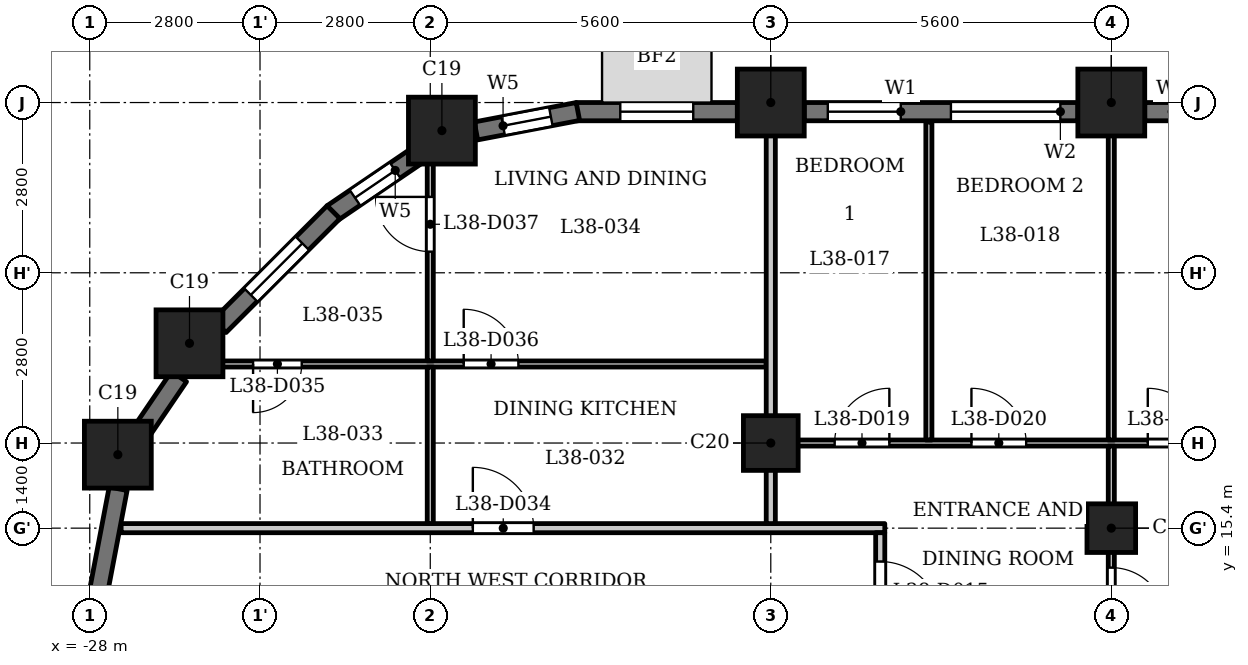
"""IFC4 building model, lengths in metres.
Left out: names, types, materials, properties, quantities, classifications, styles, units other than length and angle.
Written with IfcOpenShell. Run it as: python <this file> out.ifc"""

import sys

from ifc_helpers import new_model, si_unit, direction, frame, frame_2d, origin, origin_2d, place, context, subcontext, project, spatial, rectangle, extrude, element, fill, save


model = new_model("IFC4")
c1 = context("Model", 3, precision=1e-05, world=origin(), true_north=direction((0.0, 1.0)))
c2 = subcontext(c1, "Body", "Model", "MODEL_VIEW")
j1 = project(units=[si_unit("LENGTHUNIT", "METRE"), si_unit("PLANEANGLEUNIT", "RADIAN")], contexts=[c1])
p1 = place(None, origin())
s1 = spatial("IfcSite", under=j1, at=p1, CompositionType="ELEMENT")
p2 = place(p1, origin())
s2 = spatial("IfcBuilding", under=s1, at=p2, CompositionType="ELEMENT")
p3 = place(p2, frame((0.0, 0.0, 150.1)))
s3 = spatial("IfcBuildingStorey", under=s2, at=p3, CompositionType="ELEMENT", Elevation=150.1)
for number, where, z_axis, x_axis in (
    (1, (-11.2, 22.4, 0.0), (0.0, 0.0, 1.0), (1.0, 0.0, 0.0)),
    (2, (-16.8, 22.4, 0.0), (0.0, 0.0, 1.0), (1.0, 0.0, 0.0)),
    (3, (-22.209, 21.938, 0.0), (0.0, 0.0, 1.0), (1.0, 0.0, 0.0)),
    (4, (-26.36, 18.44, 0.0), (0.0, 0.0, 1.0), (1.0, 0.0, 0.0)),
    (5, (-27.538, 16.609, 0.0), (0.0, 0.0, 1.0), (1.0, 0.0, 0.0)),
):
    element("IfcColumn", number, at=place(p3, frame(where, z_axis=z_axis, x_axis=x_axis)), inside=s3, PredefinedType="COLUMN", context=c2, shape_type="SweptSolid", body=[
        extrude(rectangle(XDim=1.1, YDim=1.1, at=origin_2d()), origin(), (0.0, 0.0, 1.0), 3.5),
    ])
p4 = place(p3, frame((-16.8, 16.8, 0.0), z_axis=(0.0, 0.0, 1.0), x_axis=(1.0, 0.0, 0.0)))
e6 = element("IfcColumn", 6, at=p4, inside=s3, PredefinedType="COLUMN", context=c2, shape_type="SweptSolid", body=[
    extrude(rectangle(XDim=0.9, YDim=0.9, at=origin_2d()), origin(), (0.0, 0.0, 1.0), 3.5),
])
p5 = place(p3, frame((-11.2, 15.4, 0.0), z_axis=(0.0, 0.0, 1.0), x_axis=(1.0, 0.0, 0.0)))
e7 = element("IfcColumn", 7, at=p5, inside=s3, PredefinedType="COLUMN", context=c2, shape_type="SweptSolid", body=[
    extrude(rectangle(XDim=0.8, YDim=0.8, at=origin_2d()), origin(), (0.0, 0.0, 1.0), 3.5),
])
p6 = place(p3, frame((-6.15, 22.25, 0.0), z_axis=(0.0, 0.0, 1.0), x_axis=(-1.0, 0.0, 0.0)))
e8 = element("IfcWall", 8, at=p6, inside=s3, PredefinedType="SOLIDWALL", context=c2, shape_type="SweptSolid", body=[
    extrude(rectangle(XDim=4.5, YDim=0.3, at=frame_2d((2.25, 0.0))), origin(), (0.0, 0.0, 1.0), 2.45),
])
p7 = place(p6, frame((0.45, 0.0, 1.2)))
e9 = element("IfcOpeningElement", 9, at=p7, cuts=e8, PredefinedType="OPENING", context=c2, shape_type="SweptSolid", body=[
    extrude(rectangle(XDim=3.6, YDim=0.95, at=frame_2d((1.8, 0.475))), frame((0.0, 0.16, 0.0), z_axis=(0.0, -1.0, 0.0), x_axis=(1.0, 0.0, 0.0)), (0.0, 0.0, 1.0), 0.32),
])
p8 = place(p3, frame((-11.75, 22.25, 0.0), z_axis=(0.0, 0.0, 1.0), x_axis=(-1.0, 0.0, 0.0)))
e10 = element("IfcWall", 10, at=p8, inside=s3, PredefinedType="SOLIDWALL", context=c2, shape_type="SweptSolid", body=[
    extrude(rectangle(XDim=4.5, YDim=0.3, at=frame_2d((2.25, 0.0))), origin(), (0.0, 0.0, 1.0), 2.45),
])
p9 = place(p8, frame((0.288, 0.0, 0.9)))
e11 = element("IfcOpeningElement", 11, at=p9, cuts=e10, PredefinedType="OPENING", context=c2, shape_type="SweptSolid", body=[
    extrude(rectangle(XDim=1.8, YDim=1.25, at=frame_2d((0.9, 0.625))), frame((0.0, 0.16, 0.0), z_axis=(0.0, -1.0, 0.0), x_axis=(1.0, 0.0, 0.0)), (0.0, 0.0, 1.0), 0.32),
])
p10 = place(p8, frame((2.913, 0.0, 0.6)))
e12 = element("IfcOpeningElement", 12, at=p10, cuts=e10, PredefinedType="OPENING", context=c2, shape_type="SweptSolid", body=[
    extrude(rectangle(XDim=1.2, YDim=1.55, at=frame_2d((0.6, 0.775))), frame((0.0, 0.16, 0.0), z_axis=(0.0, -1.0, 0.0), x_axis=(1.0, 0.0, 0.0)), (0.0, 0.0, 1.0), 0.32),
])
p11 = place(p3, frame((-17.35, 22.25, 0.0), z_axis=(0.0, 0.0, 1.0), x_axis=(-1.0, 0.0, 0.0)))
e13 = element("IfcWall", 13, at=p11, inside=s3, PredefinedType="SOLIDWALL", context=c2, shape_type="SweptSolid", body=[
    extrude(rectangle(XDim=2.65, YDim=0.3, at=frame_2d((1.325, 0.0))), origin(), (0.0, 0.0, 1.0), 2.45),
])
p12 = place(p11, frame((0.725, 0.0, 0.6)))
e14 = element("IfcOpeningElement", 14, at=p12, cuts=e13, PredefinedType="OPENING", context=c2, shape_type="SweptSolid", body=[
    extrude(rectangle(XDim=1.2, YDim=1.55, at=frame_2d((0.6, 0.775))), frame((0.0, 0.16, 0.0), z_axis=(0.0, -1.0, 0.0), x_axis=(1.0, 0.0, 0.0)), (0.0, 0.0, 1.0), 0.32),
])
p13 = place(p3, frame((-19.972, 22.253, 0.0), z_axis=(0.0, 0.0, 1.0), x_axis=(-0.982297206936, -0.187329114784, 0.0)))
e15 = element("IfcWall", 15, at=p13, inside=s3, PredefinedType="SOLIDWALL", context=c2, shape_type="SweptSolid", body=[
    extrude(rectangle(XDim=1.706, YDim=0.3, at=frame_2d((0.853, 0.0))), origin(), (0.0, 0.0, 1.0), 2.45),
])
p14 = place(p13, frame((0.453, 0.0, 0.6)))
e16 = element("IfcOpeningElement", 16, at=p14, cuts=e15, PredefinedType="OPENING", context=c2, shape_type="SweptSolid", body=[
    extrude(rectangle(XDim=0.8, YDim=1.55, at=frame_2d((0.4, 0.775))), frame((0.0, 0.16, 0.0), z_axis=(0.0, -1.0, 0.0), x_axis=(1.0, 0.0, 0.0)), (0.0, 0.0, 1.0), 0.32),
])
p15 = place(p3, frame((-22.602, 21.538, 0.0), z_axis=(0.0, 0.0, 1.0), x_axis=(-0.827040942766, -0.562141689424, 0.0)))
e17 = element("IfcWall", 17, at=p15, inside=s3, PredefinedType="SOLIDWALL", context=c2, shape_type="SweptSolid", body=[
    extrude(rectangle(XDim=1.706, YDim=0.3, at=frame_2d((0.853, 0.0))), origin(), (0.0, 0.0, 1.0), 2.45),
])
p16 = place(p15, frame((0.453, 0.0, 0.6)))
e18 = element("IfcOpeningElement", 18, at=p16, cuts=e17, PredefinedType="OPENING", context=c2, shape_type="SweptSolid", body=[
    extrude(rectangle(XDim=0.8, YDim=1.55, at=frame_2d((0.4, 0.775))), frame((0.0, 0.16, 0.0), z_axis=(0.0, -1.0, 0.0), x_axis=(1.0, 0.0, 0.0)), (0.0, 0.0, 1.0), 0.32),
])
p17 = place(p3, frame((-23.991, 20.597, 0.0), z_axis=(0.0, 0.0, 1.0), x_axis=(-0.707106781187, -0.707106781187, 0.0)))
e19 = element("IfcWall", 19, at=p17, inside=s3, PredefinedType="SOLIDWALL", context=c2, shape_type="SweptSolid", body=[
    extrude(rectangle(XDim=2.65, YDim=0.3, at=frame_2d((1.325, 0.0))), origin(), (0.0, 0.0, 1.0), 2.45),
])
p18 = place(p17, frame((0.725, 0.0, 0.6)))
e20 = element("IfcOpeningElement", 20, at=p18, cuts=e19, PredefinedType="OPENING", context=c2, shape_type="SweptSolid", body=[
    extrude(rectangle(XDim=1.2, YDim=1.55, at=frame_2d((0.6, 0.775))), frame((0.0, 0.16, 0.0), z_axis=(0.0, -1.0, 0.0), x_axis=(1.0, 0.0, 0.0)), (0.0, 0.0, 1.0), 0.32),
])
p19 = place(p3, frame((-26.532, 17.893, 0.0), z_axis=(0.0, 0.0, 1.0), x_axis=(-0.562105419172, -0.82706559458, 0.0)))
e21 = element("IfcWall", 21, at=p19, inside=s3, PredefinedType="SOLIDWALL", context=c2, shape_type="SweptSolid", body=[
    extrude(rectangle(XDim=1.077, YDim=0.3, at=frame_2d((0.539, 0.0))), origin(), (0.0, 0.0, 1.0), 3.2),
])
p20 = place(p3, frame((-27.533, 16.048, 0.0), z_axis=(0.0, 0.0, 1.0), x_axis=(-0.187302784601, -0.982302227871, 0.0)))
e22 = element("IfcWall", 22, at=p20, inside=s3, PredefinedType="SOLIDWALL", context=c2, shape_type="SweptSolid", body=[
    extrude(rectangle(XDim=1.706, YDim=0.3, at=frame_2d((0.853, 0.0))), origin(), (0.0, 0.0, 1.0), 2.45),
])
p21 = place(p3, frame((-27.484, 15.4, 0.0), z_axis=(0.0, 0.0, 1.0), x_axis=(1.0, 0.0, 0.0)))
e23 = element("IfcWall", 23, at=p21, inside=s3, PredefinedType="PARTITIONING", context=c2, shape_type="SweptSolid", body=[
    extrude(rectangle(XDim=12.559, YDim=0.15, at=frame_2d((6.279, 0.0))), origin(), (0.0, 0.0, 1.0), 3.2),
])
p22 = place(p21, frame((5.784, 0.0, 0.0)))
e24 = element("IfcOpeningElement", 24, at=p22, cuts=e23, PredefinedType="OPENING", context=c2, shape_type="SweptSolid", body=[
    extrude(rectangle(XDim=1.0, YDim=2.1, at=frame_2d((0.5, 1.05))), frame((0.0, 0.085, 0.0), z_axis=(0.0, -1.0, 0.0), x_axis=(1.0, 0.0, 0.0)), (0.0, 0.0, 1.0), 0.17),
])
p23 = place(p3, frame((-16.725, 16.8, 0.0), z_axis=(0.0, 0.0, 1.0), x_axis=(1.0, 0.0, 0.0)))
e25 = element("IfcWall", 25, at=p23, inside=s3, PredefinedType="PARTITIONING", context=c2, shape_type="SweptSolid", body=[
    extrude(rectangle(XDim=33.45, YDim=0.1, at=frame_2d((16.725, 0.0))), origin(), (0.0, 0.0, 1.0), 3.2),
])
p24 = place(p23, frame((9.575, 0.0, 0.0)))
e26 = element("IfcOpeningElement", 26, at=p24, cuts=e25, PredefinedType="OPENING", context=c2, shape_type="SweptSolid", body=[
    extrude(rectangle(XDim=0.8, YDim=2.1, at=frame_2d((0.4, 1.05))), frame((0.0, 0.06, 0.0), z_axis=(0.0, -1.0, 0.0), x_axis=(1.0, 0.0, 0.0)), (0.0, 0.0, 1.0), 0.12),
])
p25 = place(p23, frame((6.125, 0.0, 0.0)))
e27 = element("IfcOpeningElement", 27, at=p25, cuts=e25, PredefinedType="OPENING", context=c2, shape_type="SweptSolid", body=[
    extrude(rectangle(XDim=0.9, YDim=2.1, at=frame_2d((0.45, 1.05))), frame((0.0, 0.06, 0.0), z_axis=(0.0, -1.0, 0.0), x_axis=(1.0, 0.0, 0.0)), (0.0, 0.0, 1.0), 0.12),
])
p26 = place(p23, frame((0.975, 0.0, 0.0)))
e28 = element("IfcOpeningElement", 28, at=p26, cuts=e25, PredefinedType="OPENING", context=c2, shape_type="SweptSolid", body=[
    extrude(rectangle(XDim=0.9, YDim=2.1, at=frame_2d((0.45, 1.05))), frame((0.0, 0.06, 0.0), z_axis=(0.0, -1.0, 0.0), x_axis=(1.0, 0.0, 0.0)), (0.0, 0.0, 1.0), 0.12),
])
p27 = place(p23, frame((3.225, 0.0, 0.0)))
e29 = element("IfcOpeningElement", 29, at=p27, cuts=e25, PredefinedType="OPENING", context=c2, shape_type="SweptSolid", body=[
    extrude(rectangle(XDim=0.9, YDim=2.1, at=frame_2d((0.45, 1.05))), frame((0.0, 0.06, 0.0), z_axis=(0.0, -1.0, 0.0), x_axis=(1.0, 0.0, 0.0)), (0.0, 0.0, 1.0), 0.12),
])
p28 = place(p23, frame((15.375, 0.0, 0.0)))
e30 = element("IfcOpeningElement", 30, at=p28, cuts=e25, PredefinedType="OPENING", context=c2, shape_type="SweptSolid", body=[
    extrude(rectangle(XDim=0.8, YDim=2.1, at=frame_2d((0.4, 1.05))), frame((0.0, 0.06, 0.0), z_axis=(0.0, -1.0, 0.0), x_axis=(1.0, 0.0, 0.0)), (0.0, 0.0, 1.0), 0.12),
])
p29 = place(p23, frame((13.175, 0.0, 0.0)))
e31 = element("IfcOpeningElement", 31, at=p29, cuts=e25, PredefinedType="OPENING", context=c2, shape_type="SweptSolid", body=[
    extrude(rectangle(XDim=0.9, YDim=2.1, at=frame_2d((0.45, 1.05))), frame((0.0, 0.06, 0.0), z_axis=(0.0, -1.0, 0.0), x_axis=(1.0, 0.0, 0.0)), (0.0, 0.0, 1.0), 0.12),
])
p30 = place(p23, frame((31.975, 0.0, 0.0)))
e32 = element("IfcOpeningElement", 32, at=p30, cuts=e25, PredefinedType="OPENING", context=c2, shape_type="SweptSolid", body=[
    extrude(rectangle(XDim=0.9, YDim=2.1, at=frame_2d((0.45, 1.05))), frame((0.0, 0.06, 0.0), z_axis=(0.0, -1.0, 0.0), x_axis=(1.0, 0.0, 0.0)), (0.0, 0.0, 1.0), 0.12),
])
p31 = place(p23, frame((22.875, 0.0, 0.0)))
e33 = element("IfcOpeningElement", 33, at=p31, cuts=e25, PredefinedType="OPENING", context=c2, shape_type="SweptSolid", body=[
    extrude(rectangle(XDim=0.9, YDim=2.1, at=frame_2d((0.45, 1.05))), frame((0.0, 0.06, 0.0), z_axis=(0.0, -1.0, 0.0), x_axis=(1.0, 0.0, 0.0)), (0.0, 0.0, 1.0), 0.12),
])
p32 = place(p3, frame((-26.44, 18.1, 0.0), z_axis=(0.0, 0.0, 1.0), x_axis=(1.0, 0.0, 0.0)))
e34 = element("IfcWall", 34, at=p32, inside=s3, PredefinedType="PARTITIONING", context=c2, shape_type="SweptSolid", body=[
    extrude(rectangle(XDim=9.565, YDim=0.1, at=frame_2d((4.782, 0.0))), origin(), (0.0, 0.0, 1.0), 3.2),
])
p33 = place(p32, frame((1.126, 0.0, 0.0)))
e35 = element("IfcOpeningElement", 35, at=p33, cuts=e34, PredefinedType="OPENING", context=c2, shape_type="SweptSolid", body=[
    extrude(rectangle(XDim=0.8, YDim=2.1, at=frame_2d((0.4, 1.05))), frame((0.0, 0.06, 0.0), z_axis=(0.0, -1.0, 0.0), x_axis=(1.0, 0.0, 0.0)), (0.0, 0.0, 1.0), 0.12),
])
p34 = place(p32, frame((4.59, 0.0, 0.0)))
e36 = element("IfcOpeningElement", 36, at=p34, cuts=e34, PredefinedType="OPENING", context=c2, shape_type="SweptSolid", body=[
    extrude(rectangle(XDim=0.9, YDim=2.1, at=frame_2d((0.45, 1.05))), frame((0.0, 0.06, 0.0), z_axis=(0.0, -1.0, 0.0), x_axis=(1.0, 0.0, 0.0)), (0.0, 0.0, 1.0), 0.12),
])
p35 = place(p3, frame((-22.4, 15.475, 0.0), z_axis=(0.0, 0.0, 1.0), x_axis=(0.0, 1.0, 0.0)))
e37 = element("IfcWall", 37, at=p35, inside=s3, PredefinedType="PARTITIONING", context=c2, shape_type="SweptSolid", body=[
    extrude(rectangle(XDim=2.575, YDim=0.1, at=frame_2d((1.288, 0.0))), origin(), (0.0, 0.0, 1.0), 3.2),
])
p36 = place(p3, frame((-22.4, 18.15, 0.0), z_axis=(0.0, 0.0, 1.0), x_axis=(0.0, 1.0, 0.0)))
e38 = element("IfcWall", 38, at=p36, inside=s3, PredefinedType="PARTITIONING", context=c2, shape_type="SweptSolid", body=[
    extrude(rectangle(XDim=3.57, YDim=0.1, at=frame_2d((1.785, 0.0))), origin(), (0.0, 0.0, 1.0), 3.2),
])
p37 = place(p36, frame((1.798, 0.0, 0.0)))
e39 = element("IfcOpeningElement", 39, at=p37, cuts=e38, PredefinedType="OPENING", context=c2, shape_type="SweptSolid", body=[
    extrude(rectangle(XDim=0.9, YDim=2.1, at=frame_2d((0.45, 1.05))), frame((0.0, 0.06, 0.0), z_axis=(0.0, -1.0, 0.0), x_axis=(1.0, 0.0, 0.0)), (0.0, 0.0, 1.0), 0.12),
])
p38 = place(p3, frame((-16.8, 15.475, 0.0), z_axis=(0.0, 0.0, 1.0), x_axis=(0.0, 1.0, 0.0)))
e40 = element("IfcWall", 40, at=p38, inside=s3, PredefinedType="PARTITIONING", context=c2, shape_type="SweptSolid", body=[
    extrude(rectangle(XDim=7.455, YDim=0.15, at=frame_2d((3.728, 0.0))), origin(), (0.0, 0.0, 1.0), 3.2),
])
p39 = place(p3, frame((-15.0, 13.275, 0.0), z_axis=(0.0, 0.0, 1.0), x_axis=(0.0, 1.0, 0.0)))
e41 = element("IfcWall", 41, at=p39, inside=s3, PredefinedType="PARTITIONING", context=c2, shape_type="SweptSolid", body=[
    extrude(rectangle(XDim=2.05, YDim=0.15, at=frame_2d((1.025, 0.0))), origin(), (0.0, 0.0, 1.0), 3.2),
])
p40 = place(p39, frame((0.576, 0.0, 0.0)))
e42 = element("IfcOpeningElement", 42, at=p40, cuts=e41, PredefinedType="OPENING", context=c2, shape_type="SweptSolid", body=[
    extrude(rectangle(XDim=1.0, YDim=2.1, at=frame_2d((0.5, 1.05))), frame((0.0, 0.085, 0.0), z_axis=(0.0, -1.0, 0.0), x_axis=(1.0, 0.0, 0.0)), (0.0, 0.0, 1.0), 0.17),
])
p41 = place(p3, frame((-14.2, 16.85, 0.0), z_axis=(0.0, 0.0, 1.0), x_axis=(0.0, 1.0, 0.0)))
e43 = element("IfcWall", 43, at=p41, inside=s3, PredefinedType="PARTITIONING", context=c2, shape_type="SweptSolid", body=[
    extrude(rectangle(XDim=5.23, YDim=0.1, at=frame_2d((2.615, 0.0))), origin(), (0.0, 0.0, 1.0), 3.2),
])
p42 = place(p3, frame((-11.2, 13.275, 0.0), z_axis=(0.0, 0.0, 1.0), x_axis=(0.0, 1.0, 0.0)))
e44 = element("IfcWall", 44, at=p42, inside=s3, PredefinedType="PARTITIONING", context=c2, shape_type="SweptSolid", body=[
    extrude(rectangle(XDim=3.475, YDim=0.1, at=frame_2d((1.738, 0.0))), origin(), (0.0, 0.0, 1.0), 3.2),
])
p43 = place(p42, frame((0.576, 0.0, 0.0)))
e45 = element("IfcOpeningElement", 45, at=p43, cuts=e44, PredefinedType="OPENING", context=c2, shape_type="SweptSolid", body=[
    extrude(rectangle(XDim=0.9, YDim=2.1, at=frame_2d((0.45, 1.05))), frame((0.0, 0.06, 0.0), z_axis=(0.0, -1.0, 0.0), x_axis=(1.0, 0.0, 0.0)), (0.0, 0.0, 1.0), 0.12),
])
p44 = place(p3, frame((-11.2, 16.85, 0.0), z_axis=(0.0, 0.0, 1.0), x_axis=(0.0, 1.0, 0.0)))
e46 = element("IfcWall", 46, at=p44, inside=s3, PredefinedType="PARTITIONING", context=c2, shape_type="SweptSolid", body=[
    extrude(rectangle(XDim=6.08, YDim=0.1, at=frame_2d((3.04, 0.0))), origin(), (0.0, 0.0, 1.0), 3.2),
])
p45 = place(p40, origin())
e47 = element("IfcDoor", 47, at=p45, inside=s3, OperationType="SINGLE_SWING_LEFT", PredefinedType="DOOR", context=c2, shape_type="SweptSolid", body=[
    extrude(rectangle(XDim=1.0, YDim=2.1, at=frame_2d((0.5, 1.05))), frame((0.0, 0.025, 0.0), z_axis=(0.0, -1.0, 0.0), x_axis=(1.0, 0.0, 0.0)), (0.0, 0.0, 1.0), 0.05),
])
fill(e42, e47)
p46 = place(p43, origin())
e48 = element("IfcDoor", 48, at=p46, inside=s3, OperationType="SINGLE_SWING_LEFT", PredefinedType="DOOR", context=c2, shape_type="SweptSolid", body=[
    extrude(rectangle(XDim=0.9, YDim=2.1, at=frame_2d((0.45, 1.05))), frame((0.0, 0.025, 0.0), z_axis=(0.0, -1.0, 0.0), x_axis=(1.0, 0.0, 0.0)), (0.0, 0.0, 1.0), 0.05),
])
fill(e45, e48)
p47 = place(p25, origin())
e49 = element("IfcDoor", 49, at=p47, inside=s3, OperationType="SINGLE_SWING_RIGHT", PredefinedType="DOOR", context=c2, shape_type="SweptSolid", body=[
    extrude(rectangle(XDim=0.9, YDim=2.1, at=frame_2d((0.45, 1.05))), frame((0.0, 0.025, 0.0), z_axis=(0.0, -1.0, 0.0), x_axis=(1.0, 0.0, 0.0)), (0.0, 0.0, 1.0), 0.05),
])
fill(e27, e49)
p48 = place(p26, origin())
e50 = element("IfcDoor", 50, at=p48, inside=s3, OperationType="SINGLE_SWING_LEFT", PredefinedType="DOOR", context=c2, shape_type="SweptSolid", body=[
    extrude(rectangle(XDim=0.9, YDim=2.1, at=frame_2d((0.45, 1.05))), frame((0.0, 0.025, 0.0), z_axis=(0.0, -1.0, 0.0), x_axis=(1.0, 0.0, 0.0)), (0.0, 0.0, 1.0), 0.05),
])
fill(e28, e50)
p49 = place(p27, origin())
e51 = element("IfcDoor", 51, at=p49, inside=s3, OperationType="SINGLE_SWING_RIGHT", PredefinedType="DOOR", context=c2, shape_type="SweptSolid", body=[
    extrude(rectangle(XDim=0.9, YDim=2.1, at=frame_2d((0.45, 1.05))), frame((0.0, 0.025, 0.0), z_axis=(0.0, -1.0, 0.0), x_axis=(1.0, 0.0, 0.0)), (0.0, 0.0, 1.0), 0.05),
])
fill(e29, e51)
p50 = place(p22, origin())
e52 = element("IfcDoor", 52, at=p50, inside=s3, OperationType="SINGLE_SWING_RIGHT", PredefinedType="DOOR", context=c2, shape_type="SweptSolid", body=[
    extrude(rectangle(XDim=1.0, YDim=2.1, at=frame_2d((0.5, 1.05))), frame((0.0, 0.025, 0.0), z_axis=(0.0, -1.0, 0.0), x_axis=(1.0, 0.0, 0.0)), (0.0, 0.0, 1.0), 0.05),
])
fill(e24, e52)
p51 = place(p33, origin())
e53 = element("IfcDoor", 53, at=p51, inside=s3, OperationType="SINGLE_SWING_LEFT", PredefinedType="DOOR", context=c2, shape_type="SweptSolid", body=[
    extrude(rectangle(XDim=0.8, YDim=2.1, at=frame_2d((0.4, 1.05))), frame((0.0, 0.025, 0.0), z_axis=(0.0, -1.0, 0.0), x_axis=(1.0, 0.0, 0.0)), (0.0, 0.0, 1.0), 0.05),
])
fill(e35, e53)
p52 = place(p34, origin())
e54 = element("IfcDoor", 54, at=p52, inside=s3, OperationType="SINGLE_SWING_RIGHT", PredefinedType="DOOR", context=c2, shape_type="SweptSolid", body=[
    extrude(rectangle(XDim=0.9, YDim=2.1, at=frame_2d((0.45, 1.05))), frame((0.0, 0.025, 0.0), z_axis=(0.0, -1.0, 0.0), x_axis=(1.0, 0.0, 0.0)), (0.0, 0.0, 1.0), 0.05),
])
fill(e36, e54)
p53 = place(p37, origin())
e55 = element("IfcDoor", 55, at=p53, inside=s3, OperationType="SINGLE_SWING_LEFT", PredefinedType="DOOR", context=c2, shape_type="SweptSolid", body=[
    extrude(rectangle(XDim=0.9, YDim=2.1, at=frame_2d((0.45, 1.05))), frame((0.0, 0.025, 0.0), z_axis=(0.0, -1.0, 0.0), x_axis=(1.0, 0.0, 0.0)), (0.0, 0.0, 1.0), 0.05),
])
fill(e39, e55)
p54 = place(p9, origin())
e56 = element("IfcWindow", 56, at=p54, inside=s3, PartitioningType="SINGLE_PANEL", PredefinedType="WINDOW", context=c2, shape_type="SweptSolid", body=[
    extrude(rectangle(XDim=1.8, YDim=1.25, at=frame_2d((0.9, 0.625))), frame((0.0, 0.03, 0.0), z_axis=(0.0, -1.0, 0.0), x_axis=(1.0, 0.0, 0.0)), (0.0, 0.0, 1.0), 0.06),
])
fill(e11, e56)
p55 = place(p10, origin())
e57 = element("IfcWindow", 57, at=p55, inside=s3, PartitioningType="SINGLE_PANEL", PredefinedType="WINDOW", context=c2, shape_type="SweptSolid", body=[
    extrude(rectangle(XDim=1.2, YDim=1.55, at=frame_2d((0.6, 0.775))), frame((0.0, 0.03, 0.0), z_axis=(0.0, -1.0, 0.0), x_axis=(1.0, 0.0, 0.0)), (0.0, 0.0, 1.0), 0.06),
])
fill(e12, e57)
p56 = place(p12, origin())
e58 = element("IfcWindow", 58, at=p56, inside=s3, PartitioningType="SINGLE_PANEL", PredefinedType="WINDOW", context=c2, shape_type="SweptSolid", body=[
    extrude(rectangle(XDim=1.2, YDim=1.55, at=frame_2d((0.6, 0.775))), frame((0.0, 0.03, 0.0), z_axis=(0.0, -1.0, 0.0), x_axis=(1.0, 0.0, 0.0)), (0.0, 0.0, 1.0), 0.06),
])
fill(e14, e58)
p57 = place(p14, origin())
e59 = element("IfcWindow", 59, at=p57, inside=s3, PartitioningType="SINGLE_PANEL", PredefinedType="WINDOW", context=c2, shape_type="SweptSolid", body=[
    extrude(rectangle(XDim=0.8, YDim=1.55, at=frame_2d((0.4, 0.775))), frame((0.0, 0.03, 0.0), z_axis=(0.0, -1.0, 0.0), x_axis=(1.0, 0.0, 0.0)), (0.0, 0.0, 1.0), 0.06),
])
fill(e16, e59)
p58 = place(p16, origin())
e60 = element("IfcWindow", 60, at=p58, inside=s3, PartitioningType="SINGLE_PANEL", PredefinedType="WINDOW", context=c2, shape_type="SweptSolid", body=[
    extrude(rectangle(XDim=0.8, YDim=1.55, at=frame_2d((0.4, 0.775))), frame((0.0, 0.03, 0.0), z_axis=(0.0, -1.0, 0.0), x_axis=(1.0, 0.0, 0.0)), (0.0, 0.0, 1.0), 0.06),
])
fill(e18, e60)
p59 = place(p18, origin())
e61 = element("IfcWindow", 61, at=p59, inside=s3, PartitioningType="SINGLE_PANEL", PredefinedType="WINDOW", context=c2, shape_type="SweptSolid", body=[
    extrude(rectangle(XDim=1.2, YDim=1.55, at=frame_2d((0.6, 0.775))), frame((0.0, 0.03, 0.0), z_axis=(0.0, -1.0, 0.0), x_axis=(1.0, 0.0, 0.0)), (0.0, 0.0, 1.0), 0.06),
])
fill(e20, e61)
save(model, sys.argv[1])
